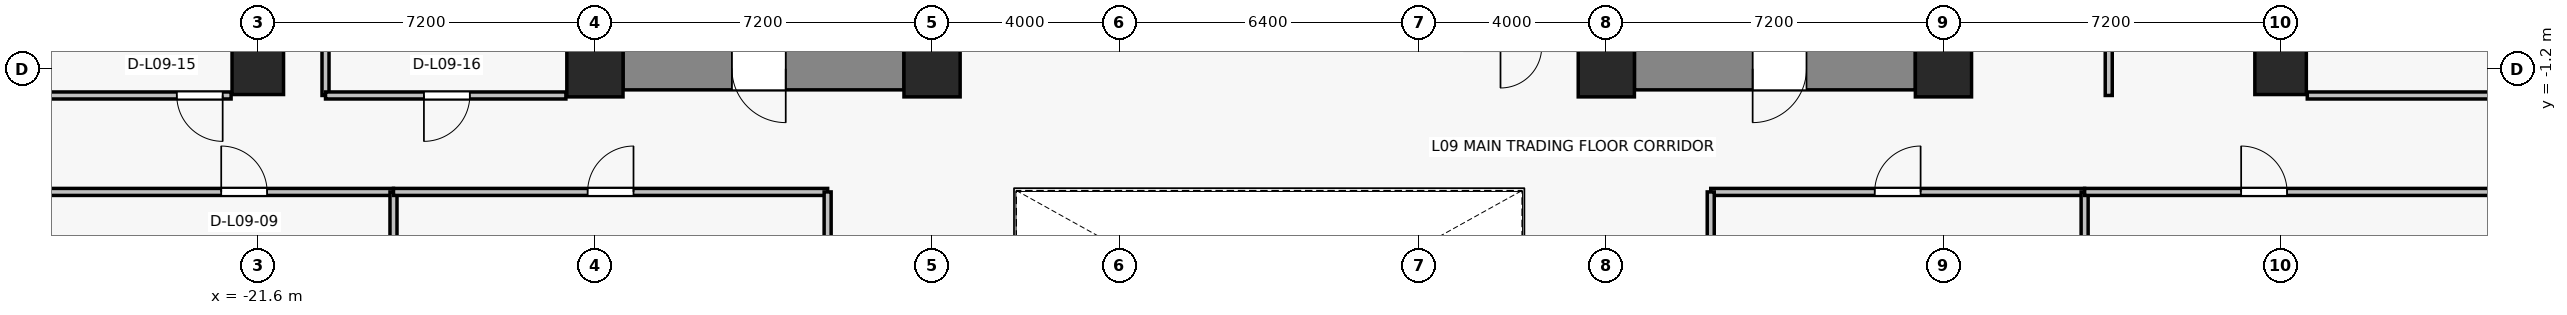
"""IFC4 building model, lengths in metres.
Left out: names, types, materials, properties, quantities, classifications, styles, units other than length and angle.
Written with IfcOpenShell. Run it as: python <this file> out.ifc"""

import sys

from ifc_helpers import new_model, si_unit, direction, frame, frame_2d, origin, origin_2d, place, context, subcontext, project, spatial, rectangle, extrude, source, transform, mapped, element, fill, save


model = new_model("IFC4")
c1 = context("Model", 3, precision=1e-05, world=origin(), true_north=direction((0.0, 1.0)))
c2 = subcontext(c1, "Body", "Model", "MODEL_VIEW")
j1 = project(units=[si_unit("LENGTHUNIT", "METRE"), si_unit("PLANEANGLEUNIT", "RADIAN")], contexts=[c1])
p1 = place(None, origin())
s1 = spatial("IfcSite", under=j1, at=p1, CompositionType="ELEMENT")
p2 = place(p1, origin())
s2 = spatial("IfcBuilding", under=s1, at=p2, CompositionType="ELEMENT")
p3 = place(p2, frame((0.0, 0.0, 37.3)))
s3 = spatial("IfcBuildingStorey", under=s2, at=p3, CompositionType="ELEMENT", Elevation=37.3)
for number, where, z_axis, x_axis in (
    (1, (-14.4, -1.2, 0.0), (0.0, 0.0, 1.0), (1.0, 0.0, 0.0)),
    (2, (-7.2, -1.2, 0.0), (0.0, 0.0, 1.0), (1.0, 0.0, 0.0)),
    (3, (7.2, -1.2, 0.0), (0.0, 0.0, 1.0), (1.0, 0.0, 0.0)),
    (4, (14.4, -1.2, 0.0), (0.0, 0.0, 1.0), (1.0, 0.0, 0.0)),
):
    element("IfcColumn", number, at=place(p3, frame(where, z_axis=z_axis, x_axis=x_axis)), inside=s3, PredefinedType="COLUMN", context=c2, shape_type="SweptSolid", body=[
        extrude(rectangle(XDim=1.2, YDim=1.2, at=origin_2d()), origin(), (0.0, 0.0, 1.0), 3.3),
    ])
for number, where, z_axis, x_axis in (
    (5, (-21.6, -1.2, 0.0), (0.0, 0.0, 1.0), (1.0, 0.0, 0.0)),
    (6, (21.6, -1.2, 0.0), (0.0, 0.0, 1.0), (1.0, 0.0, 0.0)),
):
    element("IfcColumn", number, at=place(p3, frame(where, z_axis=z_axis, x_axis=x_axis)), inside=s3, PredefinedType="COLUMN", context=c2, shape_type="SweptSolid", body=[
        extrude(rectangle(XDim=1.1, YDim=1.1, at=origin_2d()), origin(), (0.0, 0.0, 1.0), 3.3),
    ])
p4 = place(p3, frame((-7.8, -1.2, 0.0), z_axis=(0.0, 0.0, 1.0), x_axis=(-1.0, 0.0, 0.0)))
e7 = element("IfcWall", 7, at=p4, inside=s3, PredefinedType="SHEAR", context=c2, shape_type="SweptSolid", body=[
    extrude(rectangle(XDim=6.0, YDim=0.9, at=frame_2d((3.0, 0.0))), origin(), (0.0, 0.0, 1.0), 3.075),
])
p5 = place(p4, frame((2.525, 0.0, 0.0)))
e8 = element("IfcOpeningElement", 8, at=p5, cuts=e7, PredefinedType="OPENING", context=c2, shape_type="SweptSolid", body=[
    extrude(rectangle(XDim=1.15, YDim=2.15, at=frame_2d((0.575, 1.075))), frame((0.0, 0.46, 0.0), z_axis=(0.0, -1.0, 0.0), x_axis=(1.0, 0.0, 0.0)), (0.0, 0.0, 1.0), 0.92),
])
p6 = place(p3, frame((13.8, -1.2, 0.0), z_axis=(0.0, 0.0, 1.0), x_axis=(-1.0, 0.0, 0.0)))
e9 = element("IfcWall", 9, at=p6, inside=s3, PredefinedType="SHEAR", context=c2, shape_type="SweptSolid", body=[
    extrude(rectangle(XDim=6.0, YDim=0.9, at=frame_2d((3.0, 0.0))), origin(), (0.0, 0.0, 1.0), 3.075),
])
p7 = place(p6, frame((2.325, 0.0, 0.0)))
e10 = element("IfcOpeningElement", 10, at=p7, cuts=e9, PredefinedType="OPENING", context=c2, shape_type="SweptSolid", body=[
    extrude(rectangle(XDim=1.15, YDim=2.15, at=frame_2d((0.575, 1.075))), frame((0.0, 0.46, 0.0), z_axis=(0.0, -1.0, 0.0), x_axis=(1.0, 0.0, 0.0)), (0.0, 0.0, 1.0), 0.92),
])
p8 = place(p3, frame((-32.53, -3.83, 0.0), z_axis=(0.0, 0.0, 1.0), x_axis=(1.0, 0.0, 0.0)))
e11 = element("IfcWall", 11, at=p8, inside=s3, PredefinedType="PARTITIONING", context=c2, shape_type="SweptSolid", body=[
    extrude(rectangle(XDim=13.828, YDim=0.15, at=frame_2d((6.914, 0.0))), origin(), (0.0, 0.0, 1.0), 2.465),
])
p9 = place(p8, frame((10.149, 0.0, 0.0)))
e12 = element("IfcOpeningElement", 12, at=p9, cuts=e11, PredefinedType="OPENING", context=c2, shape_type="SweptSolid", body=[
    extrude(rectangle(XDim=0.98, YDim=2.15, at=frame_2d((0.49, 1.075))), frame((0.0, 0.085, 0.0), z_axis=(0.0, -1.0, 0.0), x_axis=(1.0, 0.0, 0.0)), (0.0, 0.0, 1.0), 0.17),
])
p10 = place(p3, frame((-18.702, -3.83, 0.0), z_axis=(0.0, 0.0, 1.0), x_axis=(0.0, -1.0, 0.0)))
e13 = element("IfcWall", 13, at=p10, inside=s3, PredefinedType="PARTITIONING", context=c2, shape_type="SweptSolid", body=[
    extrude(rectangle(XDim=6.69, YDim=0.15, at=frame_2d((3.345, 0.0))), origin(), (0.0, 0.0, 1.0), 2.465),
])
p11 = place(p3, frame((-18.702, -3.83, 0.0), z_axis=(0.0, 0.0, 1.0), x_axis=(1.0, 0.0, 0.0)))
e14 = element("IfcWall", 14, at=p11, inside=s3, PredefinedType="PARTITIONING", context=c2, shape_type="SweptSolid", body=[
    extrude(rectangle(XDim=9.272, YDim=0.15, at=frame_2d((4.636, 0.0))), origin(), (0.0, 0.0, 1.0), 2.465),
])
p12 = place(p11, frame((4.146, 0.0, 0.0)))
e15 = element("IfcOpeningElement", 15, at=p12, cuts=e14, PredefinedType="OPENING", context=c2, shape_type="SweptSolid", body=[
    extrude(rectangle(XDim=0.98, YDim=2.15, at=frame_2d((0.49, 1.075))), frame((0.0, 0.085, 0.0), z_axis=(0.0, -1.0, 0.0), x_axis=(1.0, 0.0, 0.0)), (0.0, 0.0, 1.0), 0.17),
])
p13 = place(p3, frame((-9.43, -3.83, 0.0), z_axis=(0.0, 0.0, 1.0), x_axis=(0.0, -1.0, 0.0)))
e16 = element("IfcWall", 16, at=p13, inside=s3, PredefinedType="PARTITIONING", context=c2, shape_type="SweptSolid", body=[
    extrude(rectangle(XDim=6.69, YDim=0.15, at=frame_2d((3.345, 0.0))), origin(), (0.0, 0.0, 1.0), 2.465),
])
p14 = place(p3, frame((9.43, -3.83, 0.0), z_axis=(0.0, 0.0, 1.0), x_axis=(1.0, 0.0, 0.0)))
e17 = element("IfcWall", 17, at=p14, inside=s3, PredefinedType="PARTITIONING", context=c2, shape_type="SweptSolid", body=[
    extrude(rectangle(XDim=7.985, YDim=0.15, at=frame_2d((3.993, 0.0))), origin(), (0.0, 0.0, 1.0), 2.465),
])
p15 = place(p14, frame((3.502, 0.0, 0.0)))
e18 = element("IfcOpeningElement", 18, at=p15, cuts=e17, PredefinedType="OPENING", context=c2, shape_type="SweptSolid", body=[
    extrude(rectangle(XDim=0.98, YDim=2.15, at=frame_2d((0.49, 1.075))), frame((0.0, 0.085, 0.0), z_axis=(0.0, -1.0, 0.0), x_axis=(1.0, 0.0, 0.0)), (0.0, 0.0, 1.0), 0.17),
])
for number, where, z_axis, x_axis in (
    (19, (9.43, -10.52, 0.0), (0.0, 0.0, 1.0), (0.0, 1.0, 0.0)),
    (20, (17.415, -3.83, 0.0), (0.0, 0.0, 1.0), (0.0, -1.0, 0.0)),
):
    element("IfcWall", number, at=place(p3, frame(where, z_axis=z_axis, x_axis=x_axis)), inside=s3, PredefinedType="PARTITIONING", context=c2, shape_type="SweptSolid", body=[
        extrude(rectangle(XDim=6.69, YDim=0.15, at=frame_2d((3.345, 0.0))), origin(), (0.0, 0.0, 1.0), 2.465),
    ])
p16 = place(p3, frame((17.415, -3.83, 0.0), z_axis=(0.0, 0.0, 1.0), x_axis=(1.0, 0.0, 0.0)))
e21 = element("IfcWall", 21, at=p16, inside=s3, PredefinedType="PARTITIONING", context=c2, shape_type="SweptSolid", body=[
    extrude(rectangle(XDim=11.115, YDim=0.15, at=frame_2d((5.558, 0.0))), origin(), (0.0, 0.0, 1.0), 2.465),
])
p17 = place(p16, frame((3.343, 0.0, 0.0)))
e22 = element("IfcOpeningElement", 22, at=p17, cuts=e21, PredefinedType="OPENING", context=c2, shape_type="SweptSolid", body=[
    extrude(rectangle(XDim=0.98, YDim=2.15, at=frame_2d((0.49, 1.075))), frame((0.0, 0.085, 0.0), z_axis=(0.0, -1.0, 0.0), x_axis=(1.0, 0.0, 0.0)), (0.0, 0.0, 1.0), 0.17),
])
p18 = place(p3, frame((-22.17, -1.77, 0.0), z_axis=(0.0, 0.0, 1.0), x_axis=(-1.0, 0.0, 0.0)))
e23 = element("IfcWall", 23, at=p18, inside=s3, PredefinedType="PARTITIONING", context=c2, shape_type="SweptSolid", body=[
    extrude(rectangle(XDim=5.177, YDim=0.15, at=frame_2d((2.588, 0.0))), origin(), (0.0, 0.0, 1.0), 3.075),
])
p19 = place(p18, frame((0.18, 0.0, 0.0)))
e24 = element("IfcOpeningElement", 24, at=p19, cuts=e23, PredefinedType="OPENING", context=c2, shape_type="SweptSolid", body=[
    extrude(rectangle(XDim=0.98, YDim=2.15, at=frame_2d((0.49, 1.075))), frame((0.0, 0.085, 0.0), z_axis=(0.0, -1.0, 0.0), x_axis=(1.0, 0.0, 0.0)), (0.0, 0.0, 1.0), 0.17),
])
p20 = place(p3, frame((-20.154, 13.88, 0.0), z_axis=(0.0, 0.0, 1.0), x_axis=(0.0, -1.0, 0.0)))
e25 = element("IfcWall", 25, at=p20, inside=s3, PredefinedType="PARTITIONING", context=c2, shape_type="SweptSolid", body=[
    extrude(rectangle(XDim=15.65, YDim=0.15, at=frame_2d((7.825, 0.0))), origin(), (0.0, 0.0, 1.0), 2.465),
])
p21 = place(p3, frame((-15.02, -1.77, 0.0), z_axis=(0.0, 0.0, 1.0), x_axis=(-1.0, 0.0, 0.0)))
e26 = element("IfcWall", 26, at=p21, inside=s3, PredefinedType="PARTITIONING", context=c2, shape_type="SweptSolid", body=[
    extrude(rectangle(XDim=5.134, YDim=0.15, at=frame_2d((2.567, 0.0))), origin(), (0.0, 0.0, 1.0), 3.075),
])
p22 = place(p21, frame((2.052, 0.0, 0.0)))
e27 = element("IfcOpeningElement", 27, at=p22, cuts=e26, PredefinedType="OPENING", context=c2, shape_type="SweptSolid", body=[
    extrude(rectangle(XDim=0.98, YDim=2.15, at=frame_2d((0.49, 1.075))), frame((0.0, 0.085, 0.0), z_axis=(0.0, -1.0, 0.0), x_axis=(1.0, 0.0, 0.0)), (0.0, 0.0, 1.0), 0.17),
])
p23 = place(p3, frame((28.53, -1.77, 0.0), z_axis=(0.0, 0.0, 1.0), x_axis=(-1.0, 0.0, 0.0)))
e28 = element("IfcWall", 28, at=p23, inside=s3, PredefinedType="PARTITIONING", context=c2, shape_type="SweptSolid", body=[
    extrude(rectangle(XDim=6.36, YDim=0.15, at=frame_2d((3.18, 0.0))), origin(), (0.0, 0.0, 1.0), 2.465),
])
p24 = place(p3, frame((17.93, -1.77, 0.0), z_axis=(0.0, 0.0, 1.0), x_axis=(0.0, 1.0, 0.0)))
e29 = element("IfcWall", 29, at=p24, inside=s3, PredefinedType="PARTITIONING", context=c2, shape_type="SweptSolid", body=[
    extrude(rectangle(XDim=9.103, YDim=0.15, at=frame_2d((4.551, 0.0))), origin(), (0.0, 0.0, 1.0), 2.465),
])
p25 = place(p24, frame((4.061, 0.0, 0.0)))
e30 = element("IfcOpeningElement", 30, at=p25, cuts=e29, PredefinedType="OPENING", context=c2, shape_type="SweptSolid", body=[
    extrude(rectangle(XDim=0.98, YDim=2.15, at=frame_2d((0.49, 1.075))), frame((0.0, 0.085, 0.0), z_axis=(0.0, -1.0, 0.0), x_axis=(1.0, 0.0, 0.0)), (0.0, 0.0, 1.0), 0.17),
])
m1 = source(origin(), c2, "Body", "SweptSolid", [
    extrude(rectangle(XDim=1.15, YDim=2.15, at=frame_2d((0.575, 1.075))), frame((0.0, 0.025, 0.0), z_axis=(0.0, -1.0, 0.0), x_axis=(1.0, 0.0, 0.0)), (0.0, 0.0, 1.0), 0.05),
])
p26 = place(p5, origin())
e31 = element("IfcDoor", 31, at=p26, inside=s3, OperationType="SINGLE_SWING_LEFT", PredefinedType="DOOR", context=c2, shape_type="MappedRepresentation", body=[
    mapped(m1, transform((0.0, 0.0, 0.0), x_axis=(1.0, 0.0, 0.0), y_axis=(0.0, 1.0, 0.0), z_axis=(0.0, 0.0, 1.0), scale=1.0)),
])
fill(e8, e31)
p27 = place(p7, origin())
e32 = element("IfcDoor", 32, at=p27, inside=s3, OperationType="SINGLE_SWING_RIGHT", PredefinedType="DOOR", context=c2, shape_type="MappedRepresentation", body=[
    mapped(m1, transform((0.0, 0.0, 0.0), x_axis=(1.0, 0.0, 0.0), y_axis=(0.0, 1.0, 0.0), z_axis=(0.0, 0.0, 1.0), scale=1.0)),
])
fill(e10, e32)
m2 = source(origin(), c2, "Body", "SweptSolid", [
    extrude(rectangle(XDim=0.98, YDim=2.15, at=frame_2d((0.49, 1.075))), frame((0.0, 0.025, 0.0), z_axis=(0.0, -1.0, 0.0), x_axis=(1.0, 0.0, 0.0)), (0.0, 0.0, 1.0), 0.05),
])
p28 = place(p9, origin())
e33 = element("IfcDoor", 33, at=p28, inside=s3, OperationType="SINGLE_SWING_LEFT", PredefinedType="DOOR", context=c2, shape_type="MappedRepresentation", body=[
    mapped(m2, transform((0.0, 0.0, 0.0), x_axis=(1.0, 0.0, 0.0), y_axis=(0.0, 1.0, 0.0), z_axis=(0.0, 0.0, 1.0), scale=1.0)),
])
fill(e12, e33)
p29 = place(p12, origin())
e34 = element("IfcDoor", 34, at=p29, inside=s3, OperationType="SINGLE_SWING_RIGHT", PredefinedType="DOOR", context=c2, shape_type="MappedRepresentation", body=[
    mapped(m2, transform((0.0, 0.0, 0.0), x_axis=(1.0, 0.0, 0.0), y_axis=(0.0, 1.0, 0.0), z_axis=(0.0, 0.0, 1.0), scale=1.0)),
])
fill(e15, e34)
p30 = place(p15, origin())
e35 = element("IfcDoor", 35, at=p30, inside=s3, OperationType="SINGLE_SWING_RIGHT", PredefinedType="DOOR", context=c2, shape_type="MappedRepresentation", body=[
    mapped(m2, transform((0.0, 0.0, 0.0), x_axis=(1.0, 0.0, 0.0), y_axis=(0.0, 1.0, 0.0), z_axis=(0.0, 0.0, 1.0), scale=1.0)),
])
fill(e18, e35)
p31 = place(p17, origin())
e36 = element("IfcDoor", 36, at=p31, inside=s3, OperationType="SINGLE_SWING_LEFT", PredefinedType="DOOR", context=c2, shape_type="MappedRepresentation", body=[
    mapped(m2, transform((0.0, 0.0, 0.0), x_axis=(1.0, 0.0, 0.0), y_axis=(0.0, 1.0, 0.0), z_axis=(0.0, 0.0, 1.0), scale=1.0)),
])
fill(e22, e36)
p32 = place(p19, origin())
e37 = element("IfcDoor", 37, at=p32, inside=s3, OperationType="SINGLE_SWING_LEFT", PredefinedType="DOOR", context=c2, shape_type="MappedRepresentation", body=[
    mapped(m2, transform((0.0, 0.0, 0.0), x_axis=(1.0, 0.0, 0.0), y_axis=(0.0, 1.0, 0.0), z_axis=(0.0, 0.0, 1.0), scale=1.0)),
])
fill(e24, e37)
p33 = place(p22, origin())
e38 = element("IfcDoor", 38, at=p33, inside=s3, OperationType="SINGLE_SWING_RIGHT", PredefinedType="DOOR", context=c2, shape_type="MappedRepresentation", body=[
    mapped(m2, transform((0.0, 0.0, 0.0), x_axis=(1.0, 0.0, 0.0), y_axis=(0.0, 1.0, 0.0), z_axis=(0.0, 0.0, 1.0), scale=1.0)),
])
fill(e27, e38)
save(model, sys.argv[1])
